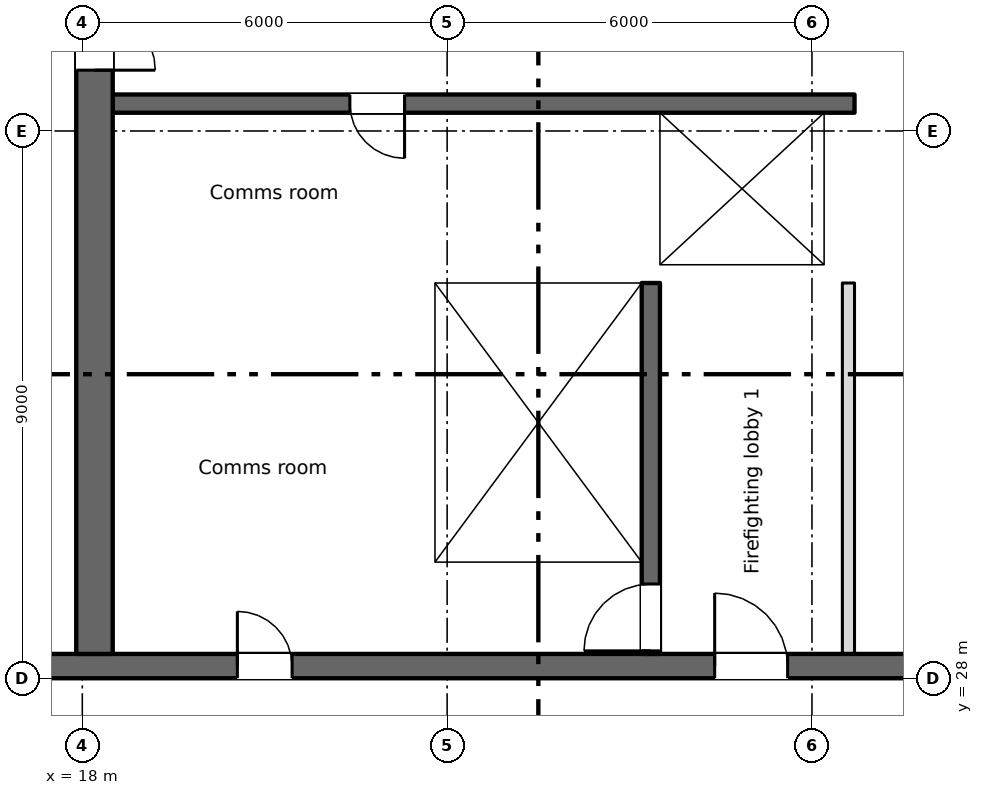
"""IFC4 building model, lengths in metres.
Left out: names, types, materials, properties, quantities, classifications, styles, units other than length and angle.
Written with IfcOpenShell. Run it as: python <this file> out.ifc"""

import sys

from ifc_helpers import new_model, si_unit, direction, frame, frame_2d, origin, place, context, subcontext, project, spatial, rectangle, extrude, element, fill, save


model = new_model("IFC4")
c1 = context("Model", 3, precision=1e-05, world=origin(), true_north=direction((0.0, 1.0)))
c2 = subcontext(c1, "Body", "Model", "MODEL_VIEW")
j1 = project(units=[si_unit("LENGTHUNIT", "METRE"), si_unit("PLANEANGLEUNIT", "RADIAN")], contexts=[c1])
p1 = place(None, origin())
s1 = spatial("IfcSite", under=j1, at=p1, CompositionType="ELEMENT")
p2 = place(p1, origin())
s2 = spatial("IfcBuilding", under=s1, at=p2, CompositionType="ELEMENT")
p3 = place(p2, frame((0.0, 0.0, 243.15)))
s3 = spatial("IfcBuildingStorey", under=s2, at=p3, CompositionType="ELEMENT", Elevation=243.15)
p4 = place(p3, frame((6.5, 28.2, 0.0), z_axis=(0.0, 0.0, 1.0), x_axis=(1.0, 0.0, 0.0)))
e1 = element("IfcWall", 1, at=p4, inside=s3, PredefinedType="SHEAR", context=c2, shape_type="SweptSolid", body=[
    extrude(rectangle(XDim=58.0, YDim=0.4, at=frame_2d((29.0, 0.0))), origin(), (0.0, 0.0, 1.0), 3.4),
])
p5 = place(p4, frame((14.05, 0.0, 0.0)))
e2 = element("IfcOpeningElement", 2, at=p5, cuts=e1, PredefinedType="OPENING", context=c2, shape_type="SweptSolid", body=[
    extrude(rectangle(XDim=0.9, YDim=2.1, at=frame_2d((0.45, 1.05))), frame((0.0, 0.21, 0.0), z_axis=(0.0, -1.0, 0.0), x_axis=(1.0, 0.0, 0.0)), (0.0, 0.0, 1.0), 0.42),
])
p6 = place(p4, frame((48.762, 0.0, 0.0)))
e3 = element("IfcOpeningElement", 3, at=p6, cuts=e1, PredefinedType="OPENING", context=c2, shape_type="SweptSolid", body=[
    extrude(rectangle(XDim=0.9, YDim=2.1, at=frame_2d((0.45, 1.05))), frame((0.0, 0.21, 0.0), z_axis=(0.0, -1.0, 0.0), x_axis=(1.0, 0.0, 0.0)), (0.0, 0.0, 1.0), 0.42),
])
p7 = place(p4, frame((51.337, 0.0, 0.0)))
e4 = element("IfcOpeningElement", 4, at=p7, cuts=e1, PredefinedType="OPENING", context=c2, shape_type="SweptSolid", body=[
    extrude(rectangle(XDim=0.9, YDim=2.1, at=frame_2d((0.45, 1.05))), frame((0.0, 0.21, 0.0), z_axis=(0.0, -1.0, 0.0), x_axis=(1.0, 0.0, 0.0)), (0.0, 0.0, 1.0), 0.42),
])
p8 = place(p4, frame((1.55, 0.0, 0.0)))
e5 = element("IfcOpeningElement", 5, at=p8, cuts=e1, PredefinedType="OPENING", context=c2, shape_type="SweptSolid", body=[
    extrude(rectangle(XDim=0.9, YDim=2.1, at=frame_2d((0.45, 1.05))), frame((0.0, 0.21, 0.0), z_axis=(0.0, -1.0, 0.0), x_axis=(1.0, 0.0, 0.0)), (0.0, 0.0, 1.0), 0.42),
])
p9 = place(p4, frame((4.9, 0.0, 0.0)))
e6 = element("IfcOpeningElement", 6, at=p9, cuts=e1, PredefinedType="OPENING", context=c2, shape_type="SweptSolid", body=[
    extrude(rectangle(XDim=1.2, YDim=2.1, at=frame_2d((0.6, 1.05))), frame((0.0, 0.21, 0.0), z_axis=(0.0, -1.0, 0.0), x_axis=(1.0, 0.0, 0.0)), (0.0, 0.0, 1.0), 0.42),
])
p10 = place(p4, frame((31.9, 0.0, 0.0)))
e7 = element("IfcOpeningElement", 7, at=p10, cuts=e1, PredefinedType="OPENING", context=c2, shape_type="SweptSolid", body=[
    extrude(rectangle(XDim=1.2, YDim=2.1, at=frame_2d((0.6, 1.05))), frame((0.0, 0.21, 0.0), z_axis=(0.0, -1.0, 0.0), x_axis=(1.0, 0.0, 0.0)), (0.0, 0.0, 1.0), 0.42),
])
p11 = place(p4, frame((55.4, 0.0, 0.0)))
e8 = element("IfcOpeningElement", 8, at=p11, cuts=e1, PredefinedType="OPENING", context=c2, shape_type="SweptSolid", body=[
    extrude(rectangle(XDim=1.2, YDim=2.1, at=frame_2d((0.6, 1.05))), frame((0.0, 0.21, 0.0), z_axis=(0.0, -1.0, 0.0), x_axis=(1.0, 0.0, 0.0)), (0.0, 0.0, 1.0), 0.42),
])
p12 = place(p4, frame((21.9, 0.0, 0.0)))
e9 = element("IfcOpeningElement", 9, at=p12, cuts=e1, PredefinedType="OPENING", context=c2, shape_type="SweptSolid", body=[
    extrude(rectangle(XDim=1.2, YDim=2.1, at=frame_2d((0.6, 1.05))), frame((0.0, 0.21, 0.0), z_axis=(0.0, -1.0, 0.0), x_axis=(1.0, 0.0, 0.0)), (0.0, 0.0, 1.0), 0.42),
])
p13 = place(p4, frame((41.9, 0.0, 0.0)))
e10 = element("IfcOpeningElement", 10, at=p13, cuts=e1, PredefinedType="OPENING", context=c2, shape_type="SweptSolid", body=[
    extrude(rectangle(XDim=1.2, YDim=2.1, at=frame_2d((0.6, 1.05))), frame((0.0, 0.21, 0.0), z_axis=(0.0, -1.0, 0.0), x_axis=(1.0, 0.0, 0.0)), (0.0, 0.0, 1.0), 0.42),
])
p14 = place(p4, frame((25.05, 0.0, 0.0)))
e11 = element("IfcOpeningElement", 11, at=p14, cuts=e1, PredefinedType="OPENING", context=c2, shape_type="SweptSolid", body=[
    extrude(rectangle(XDim=2.4, YDim=2.1, at=frame_2d((1.2, 1.05))), frame((0.0, 0.21, 0.0), z_axis=(0.0, -1.0, 0.0), x_axis=(1.0, 0.0, 0.0)), (0.0, 0.0, 1.0), 0.42),
])
p15 = place(p4, frame((37.55, 0.0, 0.0)))
e12 = element("IfcOpeningElement", 12, at=p15, cuts=e1, PredefinedType="OPENING", context=c2, shape_type="SweptSolid", body=[
    extrude(rectangle(XDim=2.4, YDim=2.1, at=frame_2d((1.2, 1.05))), frame((0.0, 0.21, 0.0), z_axis=(0.0, -1.0, 0.0), x_axis=(1.0, 0.0, 0.0)), (0.0, 0.0, 1.0), 0.42),
])
p16 = place(p4, frame((8.25, 0.0, 0.0)))
e13 = element("IfcOpeningElement", 13, at=p16, cuts=e1, PredefinedType="OPENING", context=c2, shape_type="SweptSolid", body=[
    extrude(rectangle(XDim=2.4, YDim=2.1, at=frame_2d((1.2, 1.05))), frame((0.0, 0.21, 0.0), z_axis=(0.0, -1.0, 0.0), x_axis=(1.0, 0.0, 0.0)), (0.0, 0.0, 1.0), 0.42),
])
p17 = place(p4, frame((29.05, 0.0, 0.0)))
e14 = element("IfcOpeningElement", 14, at=p17, cuts=e1, PredefinedType="OPENING", context=c2, shape_type="SweptSolid", body=[
    extrude(rectangle(XDim=0.9, YDim=2.1, at=frame_2d((0.45, 1.05))), frame((0.0, 0.21, 0.0), z_axis=(0.0, -1.0, 0.0), x_axis=(1.0, 0.0, 0.0)), (0.0, 0.0, 1.0), 0.42),
])
p18 = place(p4, frame((35.05, 0.0, 0.0)))
e15 = element("IfcOpeningElement", 15, at=p18, cuts=e1, PredefinedType="OPENING", context=c2, shape_type="SweptSolid", body=[
    extrude(rectangle(XDim=0.9, YDim=2.1, at=frame_2d((0.45, 1.05))), frame((0.0, 0.21, 0.0), z_axis=(0.0, -1.0, 0.0), x_axis=(1.0, 0.0, 0.0)), (0.0, 0.0, 1.0), 0.42),
])
p19 = place(p3, frame((18.2, 28.4, 0.0), z_axis=(0.0, 0.0, 1.0), x_axis=(0.0, 1.0, 0.0)))
e16 = element("IfcWall", 16, at=p19, inside=s3, PredefinedType="SHEAR", context=c2, shape_type="SweptSolid", body=[
    extrude(rectangle(XDim=17.0, YDim=0.6, at=frame_2d((8.5, 0.0))), origin(), (0.0, 0.0, 1.0), 3.4),
])
p20 = place(p19, frame((9.6, 0.0, 0.0)))
e17 = element("IfcOpeningElement", 17, at=p20, cuts=e16, PredefinedType="OPENING", context=c2, shape_type="SweptSolid", body=[
    extrude(rectangle(XDim=2.0, YDim=2.1, at=frame_2d((1.0, 1.05))), frame((0.0, 0.31, 0.0), z_axis=(0.0, -1.0, 0.0), x_axis=(1.0, 0.0, 0.0)), (0.0, 0.0, 1.0), 0.62),
])
p21 = place(p19, frame((15.45, 0.0, 0.0)))
e18 = element("IfcOpeningElement", 18, at=p21, cuts=e16, PredefinedType="OPENING", context=c2, shape_type="SweptSolid", body=[
    extrude(rectangle(XDim=1.2, YDim=2.1, at=frame_2d((0.6, 1.05))), frame((0.0, 0.31, 0.0), z_axis=(0.0, -1.0, 0.0), x_axis=(1.0, 0.0, 0.0)), (0.0, 0.0, 1.0), 0.62),
])
p22 = place(p3, frame((23.65, 28.4, 0.0), z_axis=(0.0, 0.0, 1.0), x_axis=(0.0, 1.0, 0.0)))
e19 = element("IfcWall", 19, at=p22, inside=s3, PredefinedType="SHEAR", context=c2, shape_type="SweptSolid", body=[
    extrude(rectangle(XDim=6.1, YDim=0.3, at=frame_2d((3.05, 0.0))), origin(), (0.0, 0.0, 1.0), 3.4),
])
p23 = place(p3, frame((27.35, 28.4, 0.0), z_axis=(0.0, 0.0, 1.0), x_axis=(0.0, 1.0, 0.0)))
e20 = element("IfcWall", 20, at=p23, inside=s3, PredefinedType="SHEAR", context=c2, shape_type="SweptSolid", body=[
    extrude(rectangle(XDim=6.1, YDim=0.3, at=frame_2d((3.05, 0.0))), origin(), (0.0, 0.0, 1.0), 3.4),
])
p24 = place(p23, frame((0.05, 0.0, 0.0)))
e21 = element("IfcOpeningElement", 21, at=p24, cuts=e20, PredefinedType="OPENING", context=c2, shape_type="SweptSolid", body=[
    extrude(rectangle(XDim=1.1, YDim=2.1, at=frame_2d((0.55, 1.05))), frame((0.0, 0.16, 0.0), z_axis=(0.0, -1.0, 0.0), x_axis=(1.0, 0.0, 0.0)), (0.0, 0.0, 1.0), 0.32),
])
p25 = place(p3, frame((18.5, 34.65, 0.0), z_axis=(0.0, 0.0, 1.0), x_axis=(1.0, 0.0, 0.0)))
e22 = element("IfcWall", 22, at=p25, inside=s3, PredefinedType="SHEAR", context=c2, shape_type="SweptSolid", body=[
    extrude(rectangle(XDim=12.2, YDim=0.3, at=frame_2d((6.1, 0.0))), origin(), (0.0, 0.0, 1.0), 3.4),
])
p26 = place(p25, frame((9.8, 0.0, 0.0)))
e23 = element("IfcOpeningElement", 23, at=p26, cuts=e22, PredefinedType="OPENING", context=c2, shape_type="SweptSolid", body=[
    extrude(rectangle(XDim=1.1, YDim=2.1, at=frame_2d((0.55, 1.05))), frame((0.0, 0.16, 0.0), z_axis=(0.0, -1.0, 0.0), x_axis=(1.0, 0.0, 0.0)), (0.0, 0.0, 1.0), 0.32),
])
p27 = place(p3, frame((30.7, 37.45, 0.0), z_axis=(0.0, 0.0, 1.0), x_axis=(-1.0, 0.0, 0.0)))
e24 = element("IfcWall", 24, at=p27, inside=s3, PredefinedType="SHEAR", context=c2, shape_type="SweptSolid", body=[
    extrude(rectangle(XDim=12.2, YDim=0.3, at=frame_2d((6.1, 0.0))), origin(), (0.0, 0.0, 1.0), 3.4),
])
p28 = place(p27, frame((7.4, 0.0, 0.0)))
e25 = element("IfcOpeningElement", 25, at=p28, cuts=e24, PredefinedType="OPENING", context=c2, shape_type="SweptSolid", body=[
    extrude(rectangle(XDim=0.9, YDim=2.1, at=frame_2d((0.45, 1.05))), frame((0.0, 0.16, 0.0), z_axis=(0.0, -1.0, 0.0), x_axis=(1.0, 0.0, 0.0)), (0.0, 0.0, 1.0), 0.32),
])
p29 = place(p3, frame((27.35, 34.8, 0.0), z_axis=(0.0, 0.0, 1.0), x_axis=(0.0, 1.0, 0.0)))
e26 = element("IfcWall", 26, at=p29, inside=s3, PredefinedType="SHEAR", context=c2, shape_type="SweptSolid", body=[
    extrude(rectangle(XDim=2.5, YDim=0.3, at=frame_2d((1.25, 0.0))), origin(), (0.0, 0.0, 1.0), 3.4),
])
p30 = place(p3, frame((30.45, 34.8, 0.0), z_axis=(0.0, 0.0, 1.0), x_axis=(0.0, 1.0, 0.0)))
e27 = element("IfcWall", 27, at=p30, inside=s3, PredefinedType="SHEAR", context=c2, shape_type="SweptSolid", body=[
    extrude(rectangle(XDim=2.5, YDim=0.5, at=frame_2d((1.25, 0.0))), origin(), (0.0, 0.0, 1.0), 3.4),
])
p31 = place(p3, frame((30.6, 28.4, 0.0), z_axis=(0.0, 0.0, 1.0), x_axis=(0.0, 1.0, 0.0)))
e28 = element("IfcWall", 28, at=p31, inside=s3, PredefinedType="PARTITIONING", context=c2, shape_type="SweptSolid", body=[
    extrude(rectangle(XDim=6.1, YDim=0.2, at=frame_2d((3.05, 0.0))), origin(), (0.0, 0.0, 1.0), 3.4),
])
p32 = place(p5, origin())
e29 = element("IfcDoor", 29, at=p32, inside=s3, OperationType="SINGLE_SWING_LEFT", PredefinedType="DOOR", context=c2, shape_type="SweptSolid", body=[
    extrude(rectangle(XDim=0.9, YDim=2.1, at=frame_2d((0.45, 1.05))), frame((0.0, 0.025, 0.0), z_axis=(0.0, -1.0, 0.0), x_axis=(1.0, 0.0, 0.0)), (0.0, 0.0, 1.0), 0.05),
])
fill(e2, e29)
p33 = place(p28, origin())
e30 = element("IfcDoor", 30, at=p33, inside=s3, OperationType="SINGLE_SWING_LEFT", PredefinedType="DOOR", context=c2, shape_type="SweptSolid", body=[
    extrude(rectangle(XDim=0.9, YDim=2.1, at=frame_2d((0.45, 1.05))), frame((0.0, 0.025, 0.0), z_axis=(0.0, -1.0, 0.0), x_axis=(1.0, 0.0, 0.0)), (0.0, 0.0, 1.0), 0.05),
])
fill(e25, e30)
p34 = place(p26, origin())
e31 = element("IfcDoor", 31, at=p34, inside=s3, OperationType="SLIDING_TO_LEFT", PredefinedType="DOOR", context=c2, shape_type="SweptSolid", body=[
    extrude(rectangle(XDim=1.1, YDim=2.1, at=frame_2d((0.55, 1.05))), frame((0.0, 0.025, 0.0), z_axis=(0.0, -1.0, 0.0), x_axis=(1.0, 0.0, 0.0)), (0.0, 0.0, 1.0), 0.05),
])
fill(e23, e31)
p35 = place(p24, origin())
e32 = element("IfcDoor", 32, at=p35, inside=s3, OperationType="SINGLE_SWING_LEFT", PredefinedType="DOOR", context=c2, shape_type="SweptSolid", body=[
    extrude(rectangle(XDim=1.1, YDim=2.1, at=frame_2d((0.55, 1.05))), frame((0.0, 0.025, 0.0), z_axis=(0.0, -1.0, 0.0), x_axis=(1.0, 0.0, 0.0)), (0.0, 0.0, 1.0), 0.05),
])
fill(e21, e32)
p36 = place(p12, origin())
e33 = element("IfcDoor", 33, at=p36, inside=s3, OperationType="SINGLE_SWING_LEFT", PredefinedType="DOOR", context=c2, shape_type="SweptSolid", body=[
    extrude(rectangle(XDim=1.2, YDim=2.1, at=frame_2d((0.6, 1.05))), frame((0.0, 0.025, 0.0), z_axis=(0.0, -1.0, 0.0), x_axis=(1.0, 0.0, 0.0)), (0.0, 0.0, 1.0), 0.05),
])
fill(e9, e33)
p37 = place(p20, origin())
e34 = element("IfcDoor", 34, at=p37, inside=s3, OperationType="DOUBLE_DOOR_SINGLE_SWING", PredefinedType="DOOR", context=c2, shape_type="SweptSolid", body=[
    extrude(rectangle(XDim=2.0, YDim=2.1, at=frame_2d((1.0, 1.05))), frame((0.0, 0.025, 0.0), z_axis=(0.0, -1.0, 0.0), x_axis=(1.0, 0.0, 0.0)), (0.0, 0.0, 1.0), 0.05),
])
fill(e17, e34)
save(model, sys.argv[1])
